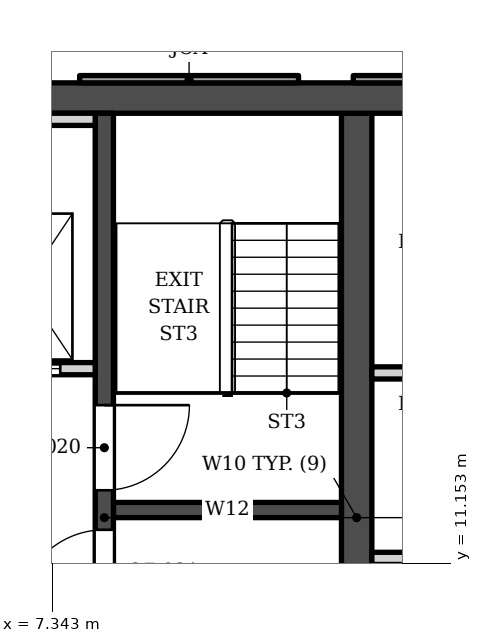
"""IFC4 building model, lengths in metres.
Left out: names, types, materials, properties, quantities, classifications, styles, units other than length and angle.
Written with IfcOpenShell. Run it as: python <this file> out.ifc"""

import sys

from ifc_helpers import new_model, si_unit, direction, frame, frame_2d, origin, place, context, subcontext, project, spatial, polyline, rectangle, outline, extrude, element, fill, save


model = new_model("IFC4")
c1 = context("Model", 3, precision=1e-05, world=origin(), true_north=direction((0.0, 1.0)))
c2 = subcontext(c1, "Body", "Model", "MODEL_VIEW")
j1 = project(units=[si_unit("LENGTHUNIT", "METRE"), si_unit("PLANEANGLEUNIT", "RADIAN")], contexts=[c1])
p1 = place(None, origin())
s1 = spatial("IfcSite", under=j1, at=p1, CompositionType="ELEMENT")
p2 = place(p1, origin())
s2 = spatial("IfcBuilding", under=s1, at=p2, CompositionType="ELEMENT")
p3 = place(p2, frame((0.0, 0.0, 219.8)))
s3 = spatial("IfcBuildingStorey", under=s2, at=p3, CompositionType="ELEMENT", Elevation=219.8)
p4 = place(p3, frame((-13.9, 18.802, 0.0), z_axis=(0.0, 0.0, 1.0), x_axis=(1.0, 0.0, 0.0)))
e1 = element("IfcWall", 1, at=p4, inside=s3, PredefinedType="SHEAR", context=c2, shape_type="SweptSolid", body=[
    extrude(rectangle(XDim=27.8, YDim=0.5, at=frame_2d((13.9, 0.0))), origin(), (0.0, 0.0, 1.0), 3.9),
])
p5 = place(p3, frame((12.35, 5.253, 0.0), z_axis=(0.0, 0.0, 1.0), x_axis=(0.0, 1.0, 0.0)))
e2 = element("IfcWall", 2, at=p5, inside=s3, PredefinedType="SHEAR", context=c2, shape_type="SweptSolid", body=[
    extrude(rectangle(XDim=13.3, YDim=0.5, at=frame_2d((6.65, 0.0))), origin(), (0.0, 0.0, 1.0), 3.9),
])
p6 = place(p3, frame((8.2, 5.253, 0.0), z_axis=(0.0, 0.0, 1.0), x_axis=(0.0, 1.0, 0.0)))
e3 = element("IfcWall", 3, at=p6, inside=s3, PredefinedType="SHEAR", context=c2, shape_type="SweptSolid", body=[
    extrude(rectangle(XDim=13.3, YDim=0.3, at=frame_2d((6.65, 0.0))), origin(), (0.0, 0.0, 1.0), 3.9),
])
p7 = place(p6, frame((7.1, 0.0, 0.0)))
e4 = element("IfcOpeningElement", 4, at=p7, cuts=e3, PredefinedType="OPENING", context=c2, shape_type="SweptSolid", body=[
    extrude(rectangle(XDim=1.4, YDim=2.1, at=frame_2d((0.7, 1.05))), frame((0.0, 0.16, 0.0), z_axis=(0.0, -1.0, 0.0), x_axis=(1.0, 0.0, 0.0)), (0.0, 0.0, 1.0), 0.32),
])
p8 = place(p6, frame((5.05, 0.0, 0.0)))
e5 = element("IfcOpeningElement", 5, at=p8, cuts=e3, PredefinedType="OPENING", context=c2, shape_type="SweptSolid", body=[
    extrude(rectangle(XDim=1.4, YDim=2.1, at=frame_2d((0.7, 1.05))), frame((0.0, 0.16, 0.0), z_axis=(0.0, -1.0, 0.0), x_axis=(1.0, 0.0, 0.0)), (0.0, 0.0, 1.0), 0.32),
])
p9 = place(p3, frame((8.35, 12.028, 0.0), z_axis=(0.0, 0.0, 1.0), x_axis=(1.0, 0.0, 0.0)))
e6 = element("IfcWall", 6, at=p9, inside=s3, PredefinedType="SHEAR", context=c2, shape_type="SweptSolid", body=[
    extrude(rectangle(XDim=3.75, YDim=0.25, at=frame_2d((1.875, 0.0))), origin(), (0.0, 0.0, 1.0), 3.9),
])
p10 = place(p3, origin())
e7 = element("IfcWall", 7, at=p10, inside=s3, PredefinedType="ELEMENTEDWALL", context=c2, shape_type="SweptSolid", body=[
    extrude(outline(polyline([(12.294, 19.173), (12.294, 19.052), (15.893, 19.052), (15.893, 19.173), (12.294, 19.173)])), origin(), (0.0, 0.0, 1.0), 3.0),
])
p11 = place(p3, origin())
e8 = element("IfcWall", 8, at=p11, inside=s3, PredefinedType="SOLIDWALL", context=c2, shape_type="SweptSolid", body=[
    extrude(outline(polyline([(7.794, 19.173), (7.794, 19.052), (11.394, 19.052), (11.394, 19.173), (7.794, 19.173)])), origin(), (0.0, 0.0, 1.0), 3.0),
])
for number, where, z_axis, x_axis in (
    (9, (12.6, 11.233, 0.0), (0.0, 0.0, 1.0), (1.0, 0.0, 0.0)),
    (10, (12.6, 14.283, 0.0), (0.0, 0.0, 1.0), (1.0, 0.0, 0.0)),
):
    element("IfcWall", number, at=place(p3, frame(where, z_axis=z_axis, x_axis=x_axis)), inside=s3, PredefinedType="SOLIDWALL", context=c2, shape_type="SweptSolid", body=[
        extrude(rectangle(XDim=1.3, YDim=0.2, at=frame_2d((0.65, 0.0))), origin(), (0.0, 0.0, 1.0), 3.73),
    ])
p12 = place(p3, frame((5.3, 14.353, 0.0), z_axis=(0.0, 0.0, 1.0), x_axis=(1.0, 0.0, 0.0)))
e11 = element("IfcWall", 11, at=p12, inside=s3, PredefinedType="SOLIDWALL", context=c2, shape_type="SweptSolid", body=[
    extrude(rectangle(XDim=2.75, YDim=0.2, at=frame_2d((1.375, 0.0))), origin(), (0.0, 0.0, 1.0), 3.73),
])
p13 = place(p12, frame((0.975, 0.0, 0.0)))
e12 = element("IfcOpeningElement", 12, at=p13, cuts=e11, PredefinedType="OPENING", context=c2, shape_type="SweptSolid", body=[
    extrude(rectangle(XDim=1.2, YDim=2.1, at=frame_2d((0.6, 1.05))), frame((0.0, 0.11, 0.0), z_axis=(0.0, -1.0, 0.0), x_axis=(1.0, 0.0, 0.0)), (0.0, 0.0, 1.0), 0.22),
])
p14 = place(p3, frame((5.5, 18.453, 0.0), z_axis=(0.0, 0.0, 1.0), x_axis=(1.0, 0.0, 0.0)))
e13 = element("IfcWall", 13, at=p14, inside=s3, PredefinedType="SOLIDWALL", context=c2, shape_type="SweptSolid", body=[
    extrude(rectangle(XDim=2.55, YDim=0.2, at=frame_2d((1.275, 0.0))), origin(), (0.0, 0.0, 1.0), 3.73),
])
p15 = place(p13, origin())
e14 = element("IfcDoor", 14, at=p15, inside=s3, OperationType="DOUBLE_DOOR_SLIDING", PredefinedType="DOOR", context=c2, shape_type="SweptSolid", body=[
    extrude(rectangle(XDim=1.2, YDim=2.1, at=frame_2d((0.6, 1.05))), frame((0.0, 0.025, 0.0), z_axis=(0.0, -1.0, 0.0), x_axis=(1.0, 0.0, 0.0)), (0.0, 0.0, 1.0), 0.05),
])
fill(e12, e14)
p16 = place(p7, origin())
e15 = element("IfcDoor", 15, at=p16, inside=s3, OperationType="SINGLE_SWING_RIGHT", PredefinedType="DOOR", context=c2, shape_type="SweptSolid", body=[
    extrude(rectangle(XDim=1.4, YDim=2.1, at=frame_2d((0.7, 1.05))), frame((0.0, 0.025, 0.0), z_axis=(0.0, -1.0, 0.0), x_axis=(1.0, 0.0, 0.0)), (0.0, 0.0, 1.0), 0.05),
])
fill(e4, e15)
p17 = place(p8, origin())
e16 = element("IfcDoor", 16, at=p17, inside=s3, OperationType="SINGLE_SWING_LEFT", PredefinedType="DOOR", context=c2, shape_type="SweptSolid", body=[
    extrude(rectangle(XDim=1.4, YDim=2.1, at=frame_2d((0.7, 1.05))), frame((0.0, 0.025, 0.0), z_axis=(0.0, -1.0, 0.0), x_axis=(1.0, 0.0, 0.0)), (0.0, 0.0, 1.0), 0.05),
])
fill(e5, e16)
save(model, sys.argv[1])
